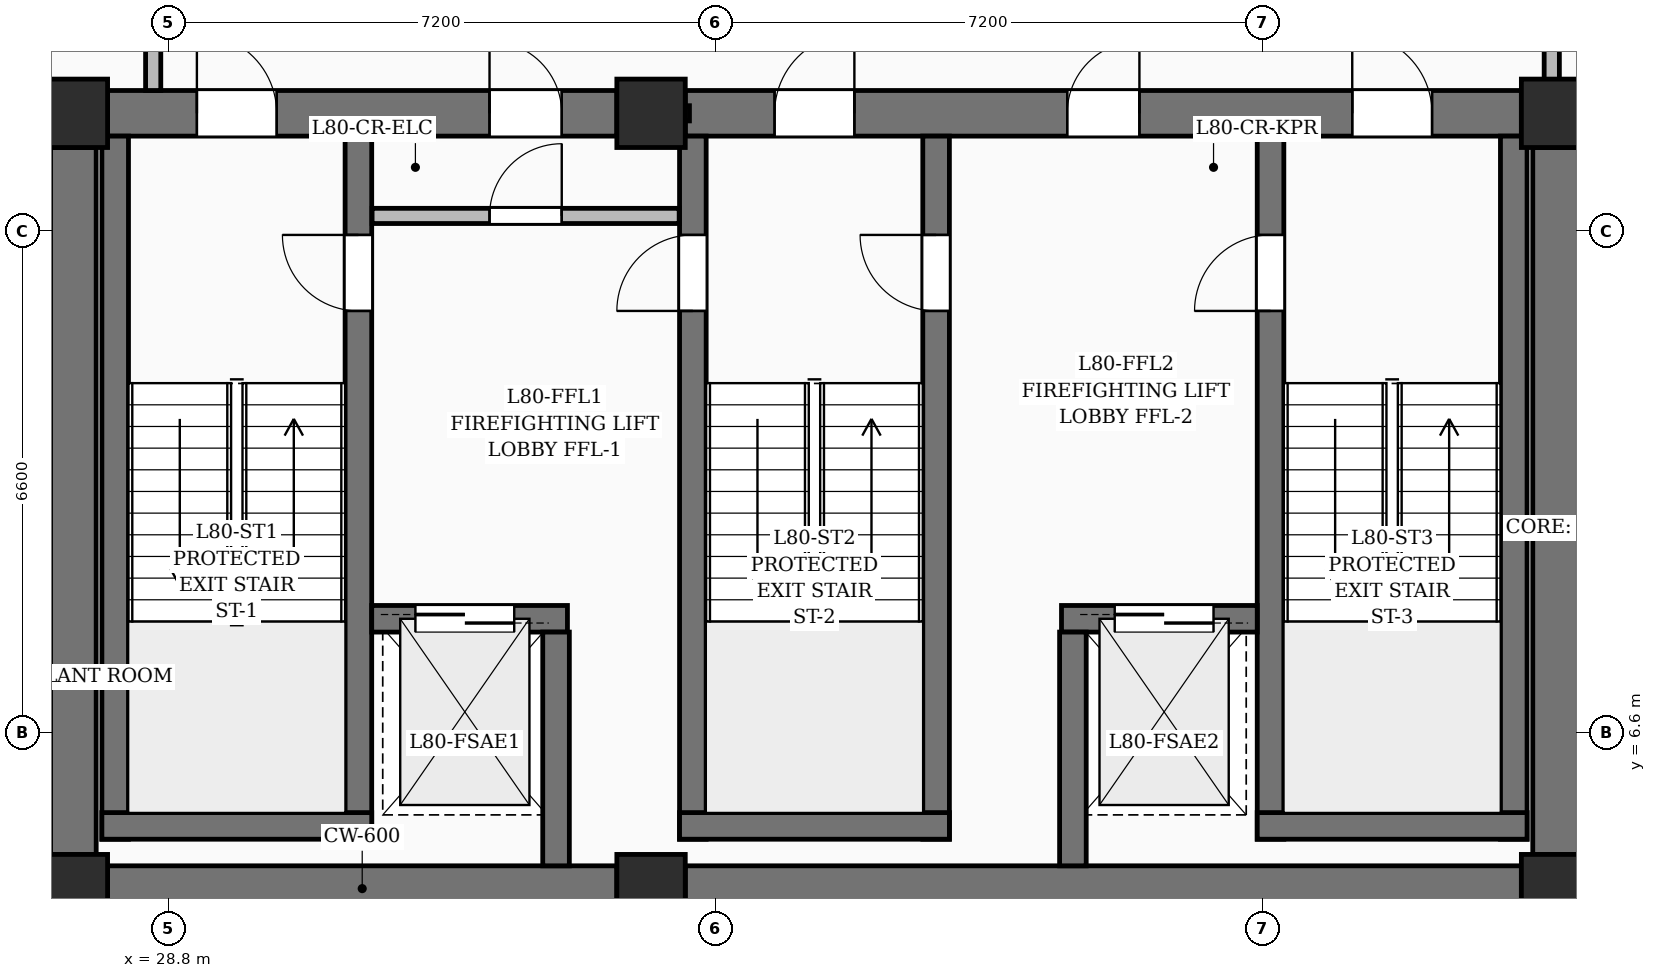
"""IFC4 building model, lengths in metres.
Left out: names, types, materials, properties, quantities, classifications, styles, units other than length and angle.
Written with IfcOpenShell. Run it as: python <this file> out.ifc"""

import sys

from ifc_helpers import new_model, si_unit, direction, frame, frame_2d, origin, origin_2d, place, context, subcontext, project, spatial, rectangle, extrude, element, fill, save


model = new_model("IFC4")
c1 = context("Model", 3, precision=1e-05, world=origin(), true_north=direction((0.0, 1.0)))
c2 = subcontext(c1, "Body", "Model", "MODEL_VIEW")
j1 = project(units=[si_unit("LENGTHUNIT", "METRE"), si_unit("PLANEANGLEUNIT", "RADIAN")], contexts=[c1])
p1 = place(None, origin())
s1 = spatial("IfcSite", under=j1, at=p1, CompositionType="ELEMENT")
p2 = place(p1, origin())
s2 = spatial("IfcBuilding", under=s1, at=p2, CompositionType="ELEMENT")
p3 = place(p2, frame((0.0, 0.0, 310.5)))
s3 = spatial("IfcBuildingStorey", under=s2, at=p3, CompositionType="ELEMENT", Elevation=310.5)
for number, where, z_axis, x_axis in (
    (1, (27.55, 4.55, 0.0), (0.0, 0.0, 1.0), (1.0, 0.0, 0.0)),
    (2, (35.15, 4.55, 0.0), (0.0, 0.0, 1.0), (1.0, 0.0, 0.0)),
    (3, (47.05, 4.55, 0.0), (0.0, 0.0, 1.0), (1.0, 0.0, 0.0)),
    (4, (27.55, 14.75, 0.0), (0.0, 0.0, 1.0), (1.0, 0.0, 0.0)),
    (5, (35.15, 14.75, 0.0), (0.0, 0.0, 1.0), (1.0, 0.0, 0.0)),
    (6, (47.05, 14.75, 0.0), (0.0, 0.0, 1.0), (1.0, 0.0, 0.0)),
):
    element("IfcColumn", number, at=place(p3, frame(where, z_axis=z_axis, x_axis=x_axis)), inside=s3, PredefinedType="COLUMN", context=c2, shape_type="SweptSolid", body=[
        extrude(rectangle(XDim=0.9, YDim=0.9, at=origin_2d()), origin(), (0.0, 0.0, 1.0), 4.0),
    ])
p4 = place(p3, frame((28.0, 4.55, 0.0), z_axis=(0.0, 0.0, 1.0), x_axis=(1.0, 0.0, 0.0)))
e7 = element("IfcWall", 7, at=p4, inside=s3, PredefinedType="SHEAR", context=c2, shape_type="SweptSolid", body=[
    extrude(rectangle(XDim=6.7, YDim=0.6, at=frame_2d((3.35, 0.0))), origin(), (0.0, 0.0, 1.0), 4.0),
])
p5 = place(p3, frame((35.6, 4.55, 0.0), z_axis=(0.0, 0.0, 1.0), x_axis=(1.0, 0.0, 0.0)))
e8 = element("IfcWall", 8, at=p5, inside=s3, PredefinedType="SHEAR", context=c2, shape_type="SweptSolid", body=[
    extrude(rectangle(XDim=11.0, YDim=0.6, at=frame_2d((5.5, 0.0))), origin(), (0.0, 0.0, 1.0), 4.0),
])
p6 = place(p3, frame((28.0, 14.75, 0.0), z_axis=(0.0, 0.0, 1.0), x_axis=(1.0, 0.0, 0.0)))
e9 = element("IfcWall", 9, at=p6, inside=s3, PredefinedType="SHEAR", context=c2, shape_type="SweptSolid", body=[
    extrude(rectangle(XDim=6.7, YDim=0.6, at=frame_2d((3.35, 0.0))), origin(), (0.0, 0.0, 1.0), 4.0),
])
p7 = place(p6, frame((1.175, 0.0, 0.0)))
e10 = element("IfcOpeningElement", 10, at=p7, cuts=e9, PredefinedType="OPENING", context=c2, shape_type="SweptSolid", body=[
    extrude(rectangle(XDim=1.05, YDim=2.15, at=frame_2d((0.525, 1.075))), frame((0.0, 0.31, 0.0), z_axis=(0.0, -1.0, 0.0), x_axis=(1.0, 0.0, 0.0)), (0.0, 0.0, 1.0), 0.62),
])
p8 = place(p6, frame((5.025, 0.0, 0.0)))
e11 = element("IfcOpeningElement", 11, at=p8, cuts=e9, PredefinedType="OPENING", context=c2, shape_type="SweptSolid", body=[
    extrude(rectangle(XDim=0.95, YDim=2.15, at=frame_2d((0.475, 1.075))), frame((0.0, 0.31, 0.0), z_axis=(0.0, -1.0, 0.0), x_axis=(1.0, 0.0, 0.0)), (0.0, 0.0, 1.0), 0.62),
])
p9 = place(p3, frame((35.6, 14.75, 0.0), z_axis=(0.0, 0.0, 1.0), x_axis=(1.0, 0.0, 0.0)))
e12 = element("IfcWall", 12, at=p9, inside=s3, PredefinedType="SHEAR", context=c2, shape_type="SweptSolid", body=[
    extrude(rectangle(XDim=11.0, YDim=0.6, at=frame_2d((5.5, 0.0))), origin(), (0.0, 0.0, 1.0), 4.0),
])
p10 = place(p9, frame((1.175, 0.0, 0.0)))
e13 = element("IfcOpeningElement", 13, at=p10, cuts=e12, PredefinedType="OPENING", context=c2, shape_type="SweptSolid", body=[
    extrude(rectangle(XDim=1.05, YDim=2.15, at=frame_2d((0.525, 1.075))), frame((0.0, 0.31, 0.0), z_axis=(0.0, -1.0, 0.0), x_axis=(1.0, 0.0, 0.0)), (0.0, 0.0, 1.0), 0.62),
])
p11 = place(p9, frame((8.775, 0.0, 0.0)))
e14 = element("IfcOpeningElement", 14, at=p11, cuts=e12, PredefinedType="OPENING", context=c2, shape_type="SweptSolid", body=[
    extrude(rectangle(XDim=1.05, YDim=2.15, at=frame_2d((0.525, 1.075))), frame((0.0, 0.31, 0.0), z_axis=(0.0, -1.0, 0.0), x_axis=(1.0, 0.0, 0.0)), (0.0, 0.0, 1.0), 0.62),
])
p12 = place(p9, frame((5.025, 0.0, 0.0)))
e15 = element("IfcOpeningElement", 15, at=p12, cuts=e12, PredefinedType="OPENING", context=c2, shape_type="SweptSolid", body=[
    extrude(rectangle(XDim=0.95, YDim=2.15, at=frame_2d((0.475, 1.075))), frame((0.0, 0.31, 0.0), z_axis=(0.0, -1.0, 0.0), x_axis=(1.0, 0.0, 0.0)), (0.0, 0.0, 1.0), 0.62),
])
for number, where, z_axis, x_axis in (
    (16, (27.55, 5.0, 0.0), (0.0, 0.0, 1.0), (0.0, 1.0, 0.0)),
    (17, (47.05, 5.0, 0.0), (0.0, 0.0, 1.0), (0.0, 1.0, 0.0)),
):
    element("IfcWall", number, at=place(p3, frame(where, z_axis=z_axis, x_axis=x_axis)), inside=s3, PredefinedType="SHEAR", context=c2, shape_type="SweptSolid", body=[
        extrude(rectangle(XDim=9.3, YDim=0.6, at=frame_2d((4.65, 0.0))), origin(), (0.0, 0.0, 1.0), 4.0),
    ])
p13 = place(p3, frame((28.1, 5.2, 0.0), z_axis=(0.0, 0.0, 1.0), x_axis=(0.0, 1.0, 0.0)))
e18 = element("IfcWall", 18, at=p13, inside=s3, PredefinedType="SOLIDWALL", context=c2, shape_type="SweptSolid", body=[
    extrude(rectangle(XDim=9.25, YDim=0.35, at=frame_2d((4.625, 0.0))), origin(), (0.0, 0.0, 1.0), 4.0),
])
p14 = place(p3, frame((31.3, 5.2, 0.0), z_axis=(0.0, 0.0, 1.0), x_axis=(0.0, 1.0, 0.0)))
e19 = element("IfcWall", 19, at=p14, inside=s3, PredefinedType="SOLIDWALL", context=c2, shape_type="SweptSolid", body=[
    extrude(rectangle(XDim=9.25, YDim=0.35, at=frame_2d((4.625, 0.0))), origin(), (0.0, 0.0, 1.0), 4.0),
])
p15 = place(p14, frame((6.95, 0.0, 0.0)))
e20 = element("IfcOpeningElement", 20, at=p15, cuts=e19, PredefinedType="OPENING", context=c2, shape_type="SweptSolid", body=[
    extrude(rectangle(XDim=1.0, YDim=2.15, at=frame_2d((0.5, 1.075))), frame((0.0, 0.185, 0.0), z_axis=(0.0, -1.0, 0.0), x_axis=(1.0, 0.0, 0.0)), (0.0, 0.0, 1.0), 0.37),
])
p16 = place(p3, frame((27.925, 5.375, 0.0), z_axis=(0.0, 0.0, 1.0), x_axis=(1.0, 0.0, 0.0)))
e21 = element("IfcWall", 21, at=p16, inside=s3, PredefinedType="SOLIDWALL", context=c2, shape_type="SweptSolid", body=[
    extrude(rectangle(XDim=3.55, YDim=0.35, at=frame_2d((1.775, 0.0))), origin(), (0.0, 0.0, 1.0), 4.0),
])
p17 = place(p3, frame((35.7, 5.2, 0.0), z_axis=(0.0, 0.0, 1.0), x_axis=(0.0, 1.0, 0.0)))
e22 = element("IfcWall", 22, at=p17, inside=s3, PredefinedType="SOLIDWALL", context=c2, shape_type="SweptSolid", body=[
    extrude(rectangle(XDim=9.25, YDim=0.35, at=frame_2d((4.625, 0.0))), origin(), (0.0, 0.0, 1.0), 4.0),
])
p18 = place(p17, frame((6.95, 0.0, 0.0)))
e23 = element("IfcOpeningElement", 23, at=p18, cuts=e22, PredefinedType="OPENING", context=c2, shape_type="SweptSolid", body=[
    extrude(rectangle(XDim=1.0, YDim=2.15, at=frame_2d((0.5, 1.075))), frame((0.0, 0.185, 0.0), z_axis=(0.0, -1.0, 0.0), x_axis=(1.0, 0.0, 0.0)), (0.0, 0.0, 1.0), 0.37),
])
p19 = place(p3, frame((38.9, 5.2, 0.0), z_axis=(0.0, 0.0, 1.0), x_axis=(0.0, 1.0, 0.0)))
e24 = element("IfcWall", 24, at=p19, inside=s3, PredefinedType="SOLIDWALL", context=c2, shape_type="SweptSolid", body=[
    extrude(rectangle(XDim=9.25, YDim=0.35, at=frame_2d((4.625, 0.0))), origin(), (0.0, 0.0, 1.0), 4.0),
])
p20 = place(p19, frame((6.95, 0.0, 0.0)))
e25 = element("IfcOpeningElement", 25, at=p20, cuts=e24, PredefinedType="OPENING", context=c2, shape_type="SweptSolid", body=[
    extrude(rectangle(XDim=1.0, YDim=2.15, at=frame_2d((0.5, 1.075))), frame((0.0, 0.185, 0.0), z_axis=(0.0, -1.0, 0.0), x_axis=(1.0, 0.0, 0.0)), (0.0, 0.0, 1.0), 0.37),
])
p21 = place(p3, frame((35.525, 5.375, 0.0), z_axis=(0.0, 0.0, 1.0), x_axis=(1.0, 0.0, 0.0)))
e26 = element("IfcWall", 26, at=p21, inside=s3, PredefinedType="SOLIDWALL", context=c2, shape_type="SweptSolid", body=[
    extrude(rectangle(XDim=3.55, YDim=0.35, at=frame_2d((1.775, 0.0))), origin(), (0.0, 0.0, 1.0), 4.0),
])
p22 = place(p3, frame((43.3, 5.2, 0.0), z_axis=(0.0, 0.0, 1.0), x_axis=(0.0, 1.0, 0.0)))
e27 = element("IfcWall", 27, at=p22, inside=s3, PredefinedType="SOLIDWALL", context=c2, shape_type="SweptSolid", body=[
    extrude(rectangle(XDim=9.25, YDim=0.35, at=frame_2d((4.625, 0.0))), origin(), (0.0, 0.0, 1.0), 4.0),
])
p23 = place(p22, frame((6.95, 0.0, 0.0)))
e28 = element("IfcOpeningElement", 28, at=p23, cuts=e27, PredefinedType="OPENING", context=c2, shape_type="SweptSolid", body=[
    extrude(rectangle(XDim=1.0, YDim=2.15, at=frame_2d((0.5, 1.075))), frame((0.0, 0.185, 0.0), z_axis=(0.0, -1.0, 0.0), x_axis=(1.0, 0.0, 0.0)), (0.0, 0.0, 1.0), 0.37),
])
p24 = place(p3, frame((46.5, 5.2, 0.0), z_axis=(0.0, 0.0, 1.0), x_axis=(0.0, 1.0, 0.0)))
e29 = element("IfcWall", 29, at=p24, inside=s3, PredefinedType="SOLIDWALL", context=c2, shape_type="SweptSolid", body=[
    extrude(rectangle(XDim=9.25, YDim=0.35, at=frame_2d((4.625, 0.0))), origin(), (0.0, 0.0, 1.0), 4.0),
])
p25 = place(p3, frame((43.125, 5.375, 0.0), z_axis=(0.0, 0.0, 1.0), x_axis=(1.0, 0.0, 0.0)))
e30 = element("IfcWall", 30, at=p25, inside=s3, PredefinedType="SOLIDWALL", context=c2, shape_type="SweptSolid", body=[
    extrude(rectangle(XDim=3.55, YDim=0.35, at=frame_2d((1.775, 0.0))), origin(), (0.0, 0.0, 1.0), 4.0),
])
p26 = place(p3, frame((31.475, 8.1, 0.0), z_axis=(0.0, 0.0, 1.0), x_axis=(1.0, 0.0, 0.0)))
e31 = element("IfcWall", 31, at=p26, inside=s3, PredefinedType="SOLIDWALL", context=c2, shape_type="SweptSolid", body=[
    extrude(rectangle(XDim=2.575, YDim=0.35, at=frame_2d((1.288, 0.0))), origin(), (0.0, 0.0, 1.0), 4.0),
])
p27 = place(p26, frame((0.575, 0.0, 0.0)))
e32 = element("IfcOpeningElement", 32, at=p27, cuts=e31, PredefinedType="OPENING", context=c2, shape_type="SweptSolid", body=[
    extrude(rectangle(XDim=1.3, YDim=2.25, at=frame_2d((0.65, 1.125))), frame((0.0, 0.185, 0.0), z_axis=(0.0, -1.0, 0.0), x_axis=(1.0, 0.0, 0.0)), (0.0, 0.0, 1.0), 0.37),
])
p28 = place(p3, frame((40.55, 8.1, 0.0), z_axis=(0.0, 0.0, 1.0), x_axis=(1.0, 0.0, 0.0)))
e33 = element("IfcWall", 33, at=p28, inside=s3, PredefinedType="SOLIDWALL", context=c2, shape_type="SweptSolid", body=[
    extrude(rectangle(XDim=2.575, YDim=0.35, at=frame_2d((1.288, 0.0))), origin(), (0.0, 0.0, 1.0), 4.0),
])
p29 = place(p28, frame((0.7, 0.0, 0.0)))
e34 = element("IfcOpeningElement", 34, at=p29, cuts=e33, PredefinedType="OPENING", context=c2, shape_type="SweptSolid", body=[
    extrude(rectangle(XDim=1.3, YDim=2.25, at=frame_2d((0.65, 1.125))), frame((0.0, 0.185, 0.0), z_axis=(0.0, -1.0, 0.0), x_axis=(1.0, 0.0, 0.0)), (0.0, 0.0, 1.0), 0.37),
])
for number, where, z_axis, x_axis in (
    (35, (33.9, 4.85, 0.0), (0.0, 0.0, 1.0), (0.0, 1.0, 0.0)),
    (36, (40.7, 4.85, 0.0), (0.0, 0.0, 1.0), (0.0, 1.0, 0.0)),
):
    element("IfcWall", number, at=place(p3, frame(where, z_axis=z_axis, x_axis=x_axis)), inside=s3, PredefinedType="SOLIDWALL", context=c2, shape_type="SweptSolid", body=[
        extrude(rectangle(XDim=3.075, YDim=0.35, at=frame_2d((1.538, 0.0))), origin(), (0.0, 0.0, 1.0), 4.0),
    ])
p30 = place(p3, frame((34.72, 14.75, 0.0), z_axis=(0.0, 0.0, 1.0), x_axis=(1.0, 0.0, 0.0)))
e37 = element("IfcWall", 37, at=p30, inside=s3, PredefinedType="PARTITIONING", context=c2, shape_type="SweptSolid", body=[
    extrude(rectangle(XDim=0.935, YDim=0.2, at=frame_2d((0.468, 0.0))), origin(), (0.0, 0.0, 1.0), 2.885),
])
p31 = place(p3, frame((31.48, 13.4, 0.0), z_axis=(0.0, 0.0, 1.0), x_axis=(1.0, 0.0, 0.0)))
e38 = element("IfcWall", 38, at=p31, inside=s3, PredefinedType="PARTITIONING", context=c2, shape_type="SweptSolid", body=[
    extrude(rectangle(XDim=4.04, YDim=0.2, at=frame_2d((2.02, 0.0))), origin(), (0.0, 0.0, 1.0), 3.7),
])
p32 = place(p31, frame((1.545, 0.0, 0.0)))
e39 = element("IfcOpeningElement", 39, at=p32, cuts=e38, PredefinedType="OPENING", context=c2, shape_type="SweptSolid", body=[
    extrude(rectangle(XDim=0.95, YDim=2.15, at=frame_2d((0.475, 1.075))), frame((0.0, 0.11, 0.0), z_axis=(0.0, -1.0, 0.0), x_axis=(1.0, 0.0, 0.0)), (0.0, 0.0, 1.0), 0.22),
])
p33 = place(p3, frame((28.6, 17.565, 0.0), z_axis=(0.0, 0.0, 1.0), x_axis=(0.0, -1.0, 0.0)))
e40 = element("IfcWall", 40, at=p33, inside=s3, PredefinedType="PARTITIONING", context=c2, shape_type="SweptSolid", body=[
    extrude(rectangle(XDim=2.515, YDim=0.2, at=frame_2d((1.257, 0.0))), origin(), (0.0, 0.0, 1.0), 3.035),
])
p34 = place(p33, frame((0.765, 0.0, 0.0)))
e41 = element("IfcOpeningElement", 41, at=p34, cuts=e40, PredefinedType="OPENING", context=c2, shape_type="SweptSolid", body=[
    extrude(rectangle(XDim=0.9, YDim=2.1, at=frame_2d((0.45, 1.05))), frame((0.0, 0.11, 0.0), z_axis=(0.0, -1.0, 0.0), x_axis=(1.0, 0.0, 0.0)), (0.0, 0.0, 1.0), 0.22),
])
p35 = place(p3, frame((47.0, 15.05, 0.0), z_axis=(0.0, 0.0, 1.0), x_axis=(0.0, 1.0, 0.0)))
e42 = element("IfcWall", 42, at=p35, inside=s3, PredefinedType="PARTITIONING", context=c2, shape_type="SweptSolid", body=[
    extrude(rectangle(XDim=2.6, YDim=0.2, at=frame_2d((1.3, 0.0))), origin(), (0.0, 0.0, 1.0), 3.035),
])
p36 = place(p7, origin())
e43 = element("IfcDoor", 43, at=p36, inside=s3, OperationType="SINGLE_SWING_LEFT", PredefinedType="DOOR", context=c2, shape_type="SweptSolid", body=[
    extrude(rectangle(XDim=1.05, YDim=2.15, at=frame_2d((0.525, 1.075))), frame((0.0, 0.025, 0.0), z_axis=(0.0, -1.0, 0.0), x_axis=(1.0, 0.0, 0.0)), (0.0, 0.0, 1.0), 0.05),
])
fill(e10, e43)
p37 = place(p10, origin())
e44 = element("IfcDoor", 44, at=p37, inside=s3, OperationType="SINGLE_SWING_RIGHT", PredefinedType="DOOR", context=c2, shape_type="SweptSolid", body=[
    extrude(rectangle(XDim=1.05, YDim=2.15, at=frame_2d((0.525, 1.075))), frame((0.0, 0.025, 0.0), z_axis=(0.0, -1.0, 0.0), x_axis=(1.0, 0.0, 0.0)), (0.0, 0.0, 1.0), 0.05),
])
fill(e13, e44)
p38 = place(p11, origin())
e45 = element("IfcDoor", 45, at=p38, inside=s3, OperationType="SINGLE_SWING_LEFT", PredefinedType="DOOR", context=c2, shape_type="SweptSolid", body=[
    extrude(rectangle(XDim=1.05, YDim=2.15, at=frame_2d((0.525, 1.075))), frame((0.0, 0.025, 0.0), z_axis=(0.0, -1.0, 0.0), x_axis=(1.0, 0.0, 0.0)), (0.0, 0.0, 1.0), 0.05),
])
fill(e14, e45)
p39 = place(p15, origin())
e46 = element("IfcDoor", 46, at=p39, inside=s3, OperationType="SINGLE_SWING_RIGHT", PredefinedType="DOOR", context=c2, shape_type="SweptSolid", body=[
    extrude(rectangle(XDim=1.0, YDim=2.15, at=frame_2d((0.5, 1.075))), frame((0.0, 0.025, 0.0), z_axis=(0.0, -1.0, 0.0), x_axis=(1.0, 0.0, 0.0)), (0.0, 0.0, 1.0), 0.05),
])
fill(e20, e46)
p40 = place(p18, origin())
e47 = element("IfcDoor", 47, at=p40, inside=s3, OperationType="SINGLE_SWING_LEFT", PredefinedType="DOOR", context=c2, shape_type="SweptSolid", body=[
    extrude(rectangle(XDim=1.0, YDim=2.15, at=frame_2d((0.5, 1.075))), frame((0.0, 0.025, 0.0), z_axis=(0.0, -1.0, 0.0), x_axis=(1.0, 0.0, 0.0)), (0.0, 0.0, 1.0), 0.05),
])
fill(e23, e47)
p41 = place(p20, origin())
e48 = element("IfcDoor", 48, at=p41, inside=s3, OperationType="SINGLE_SWING_RIGHT", PredefinedType="DOOR", context=c2, shape_type="SweptSolid", body=[
    extrude(rectangle(XDim=1.0, YDim=2.15, at=frame_2d((0.5, 1.075))), frame((0.0, 0.025, 0.0), z_axis=(0.0, -1.0, 0.0), x_axis=(1.0, 0.0, 0.0)), (0.0, 0.0, 1.0), 0.05),
])
fill(e25, e48)
p42 = place(p23, origin())
e49 = element("IfcDoor", 49, at=p42, inside=s3, OperationType="SINGLE_SWING_LEFT", PredefinedType="DOOR", context=c2, shape_type="SweptSolid", body=[
    extrude(rectangle(XDim=1.0, YDim=2.15, at=frame_2d((0.5, 1.075))), frame((0.0, 0.025, 0.0), z_axis=(0.0, -1.0, 0.0), x_axis=(1.0, 0.0, 0.0)), (0.0, 0.0, 1.0), 0.05),
])
fill(e28, e49)
p43 = place(p27, origin())
e50 = element("IfcDoor", 50, at=p43, inside=s3, OperationType="DOUBLE_DOOR_SLIDING", PredefinedType="DOOR", context=c2, shape_type="SweptSolid", body=[
    extrude(rectangle(XDim=1.3, YDim=2.25, at=frame_2d((0.65, 1.125))), frame((0.0, 0.025, 0.0), z_axis=(0.0, -1.0, 0.0), x_axis=(1.0, 0.0, 0.0)), (0.0, 0.0, 1.0), 0.05),
])
fill(e32, e50)
p44 = place(p29, origin())
e51 = element("IfcDoor", 51, at=p44, inside=s3, OperationType="DOUBLE_DOOR_SLIDING", PredefinedType="DOOR", context=c2, shape_type="SweptSolid", body=[
    extrude(rectangle(XDim=1.3, YDim=2.25, at=frame_2d((0.65, 1.125))), frame((0.0, 0.025, 0.0), z_axis=(0.0, -1.0, 0.0), x_axis=(1.0, 0.0, 0.0)), (0.0, 0.0, 1.0), 0.05),
])
fill(e34, e51)
p45 = place(p32, origin())
e52 = element("IfcDoor", 52, at=p45, inside=s3, OperationType="SINGLE_SWING_RIGHT", PredefinedType="DOOR", context=c2, shape_type="SweptSolid", body=[
    extrude(rectangle(XDim=0.95, YDim=2.15, at=frame_2d((0.475, 1.075))), frame((0.0, 0.025, 0.0), z_axis=(0.0, -1.0, 0.0), x_axis=(1.0, 0.0, 0.0)), (0.0, 0.0, 1.0), 0.05),
])
fill(e39, e52)
p46 = place(p8, origin())
e53 = element("IfcDoor", 53, at=p46, inside=s3, OperationType="SINGLE_SWING_LEFT", PredefinedType="DOOR", context=c2, shape_type="SweptSolid", body=[
    extrude(rectangle(XDim=0.95, YDim=2.15, at=frame_2d((0.475, 1.075))), frame((0.0, 0.025, 0.0), z_axis=(0.0, -1.0, 0.0), x_axis=(1.0, 0.0, 0.0)), (0.0, 0.0, 1.0), 0.05),
])
fill(e11, e53)
p47 = place(p12, origin())
e54 = element("IfcDoor", 54, at=p47, inside=s3, OperationType="SINGLE_SWING_RIGHT", PredefinedType="DOOR", context=c2, shape_type="SweptSolid", body=[
    extrude(rectangle(XDim=0.95, YDim=2.15, at=frame_2d((0.475, 1.075))), frame((0.0, 0.025, 0.0), z_axis=(0.0, -1.0, 0.0), x_axis=(1.0, 0.0, 0.0)), (0.0, 0.0, 1.0), 0.05),
])
fill(e15, e54)
save(model, sys.argv[1])
